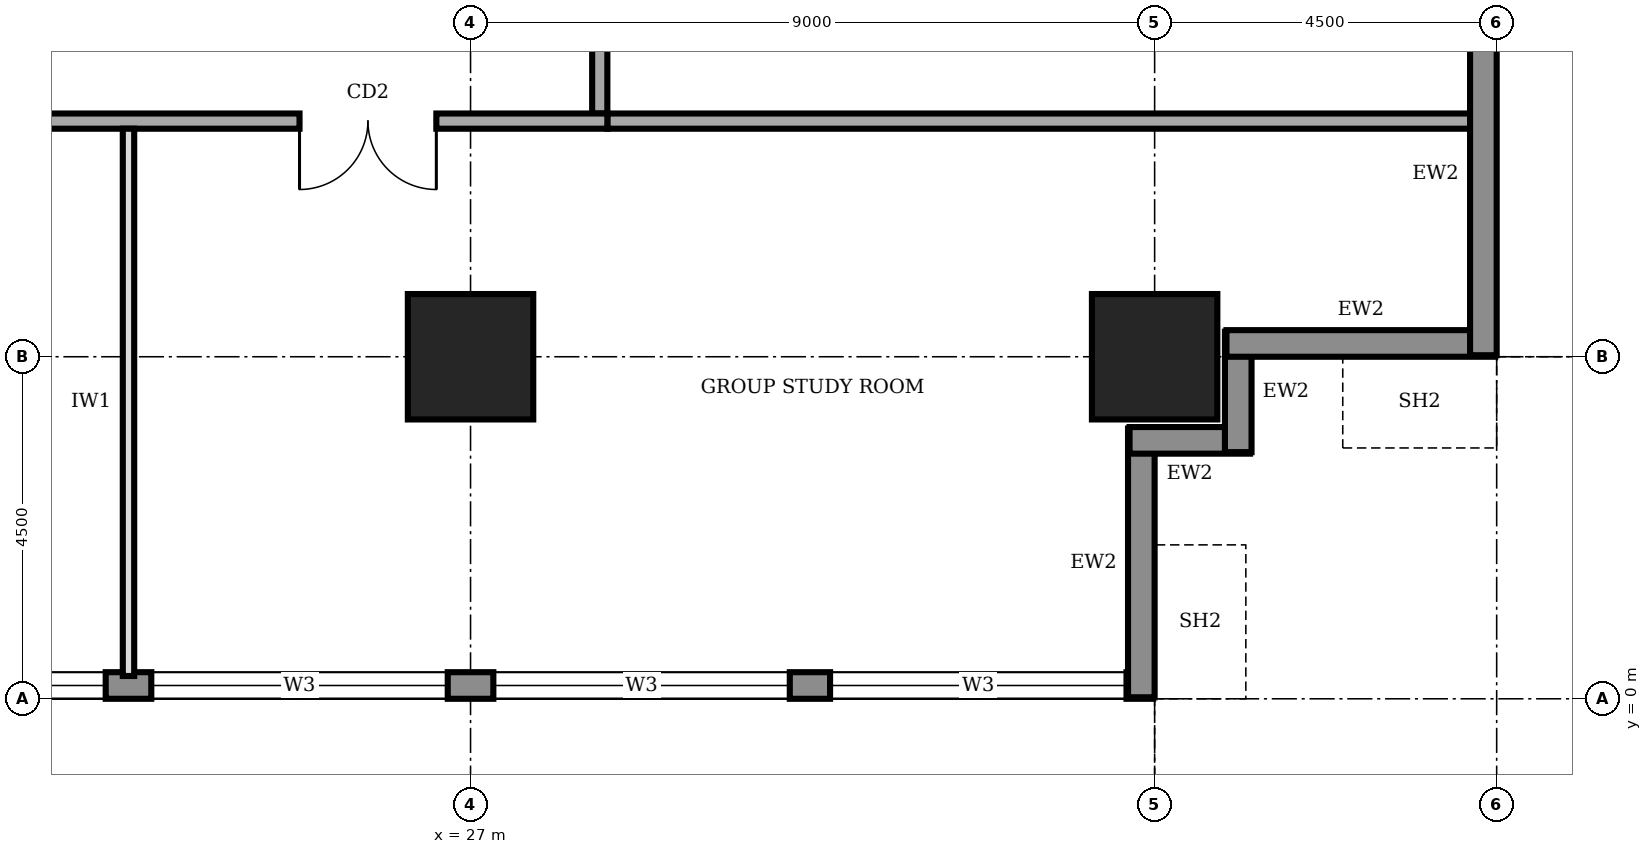
"""IFC4 building model, lengths in metres.
Left out: names, types, materials, properties, quantities, classifications, styles, units other than length and angle.
Written with IfcOpenShell. Run it as: python <this file> out.ifc"""

import sys

from ifc_helpers import new_model, si_unit, direction, frame, frame_2d, origin, origin_2d, place, context, subcontext, project, spatial, rectangle, extrude, element, fill, save


model = new_model("IFC4")
c1 = context("Model", 3, precision=1e-05, world=origin(), true_north=direction((0.0, 1.0)))
c2 = subcontext(c1, "Body", "Model", "MODEL_VIEW")
j1 = project(units=[si_unit("LENGTHUNIT", "METRE"), si_unit("PLANEANGLEUNIT", "RADIAN")], contexts=[c1])
p1 = place(None, origin())
s1 = spatial("IfcSite", under=j1, at=p1, CompositionType="ELEMENT")
p2 = place(p1, origin())
s2 = spatial("IfcBuilding", under=s1, at=p2, CompositionType="ELEMENT")
p3 = place(p2, frame((0.0, 0.0, 193.0)))
s3 = spatial("IfcBuildingStorey", under=s2, at=p3, CompositionType="ELEMENT", Elevation=193.0)
for number, where, z_axis, x_axis in (
    (1, (27.0, 4.5, 0.0), (0.0, 0.0, 1.0), (1.0, 0.0, 0.0)),
    (2, (36.0, 4.5, 0.0), (0.0, 0.0, 1.0), (1.0, 0.0, 0.0)),
):
    element("IfcColumn", number, at=place(p3, frame(where, z_axis=z_axis, x_axis=x_axis)), inside=s3, PredefinedType="COLUMN", context=c2, shape_type="SweptSolid", body=[
        extrude(rectangle(XDim=1.65, YDim=1.65, at=origin_2d()), origin(), (0.0, 0.0, 1.0), 4.0),
    ])
p4 = place(p3, frame((4.52, 0.175, 0.0), z_axis=(0.0, 0.0, 1.0), x_axis=(1.0, 0.0, 0.0)))
e3 = element("IfcWall", 3, at=p4, inside=s3, PredefinedType="STANDARD", context=c2, shape_type="SweptSolid", body=[
    extrude(rectangle(XDim=31.46, YDim=0.35, at=frame_2d((15.73, 0.0))), origin(), (0.0, 0.0, 1.0), 3.75),
])
p5 = place(p4, frame((4.78, 0.0, 0.95)))
e4 = element("IfcOpeningElement", 4, at=p5, cuts=e3, PredefinedType="OPENING", context=c2, shape_type="SweptSolid", body=[
    extrude(rectangle(XDim=3.9, YDim=1.8, at=frame_2d((1.95, 0.9))), frame((0.0, 0.185, 0.0), z_axis=(0.0, -1.0, 0.0), x_axis=(1.0, 0.0, 0.0)), (0.0, 0.0, 1.0), 0.37),
])
p6 = place(p4, frame((9.28, 0.0, 0.95)))
e5 = element("IfcOpeningElement", 5, at=p6, cuts=e3, PredefinedType="OPENING", context=c2, shape_type="SweptSolid", body=[
    extrude(rectangle(XDim=3.9, YDim=1.8, at=frame_2d((1.95, 0.9))), frame((0.0, 0.185, 0.0), z_axis=(0.0, -1.0, 0.0), x_axis=(1.0, 0.0, 0.0)), (0.0, 0.0, 1.0), 0.37),
])
p7 = place(p4, frame((13.78, 0.0, 0.95)))
e6 = element("IfcOpeningElement", 6, at=p7, cuts=e3, PredefinedType="OPENING", context=c2, shape_type="SweptSolid", body=[
    extrude(rectangle(XDim=3.9, YDim=1.8, at=frame_2d((1.95, 0.9))), frame((0.0, 0.185, 0.0), z_axis=(0.0, -1.0, 0.0), x_axis=(1.0, 0.0, 0.0)), (0.0, 0.0, 1.0), 0.37),
])
p8 = place(p4, frame((18.28, 0.0, 0.95)))
e7 = element("IfcOpeningElement", 7, at=p8, cuts=e3, PredefinedType="OPENING", context=c2, shape_type="SweptSolid", body=[
    extrude(rectangle(XDim=3.9, YDim=1.8, at=frame_2d((1.95, 0.9))), frame((0.0, 0.185, 0.0), z_axis=(0.0, -1.0, 0.0), x_axis=(1.0, 0.0, 0.0)), (0.0, 0.0, 1.0), 0.37),
])
p9 = place(p4, frame((22.78, 0.0, 0.95)))
e8 = element("IfcOpeningElement", 8, at=p9, cuts=e3, PredefinedType="OPENING", context=c2, shape_type="SweptSolid", body=[
    extrude(rectangle(XDim=3.9, YDim=1.8, at=frame_2d((1.95, 0.9))), frame((0.0, 0.185, 0.0), z_axis=(0.0, -1.0, 0.0), x_axis=(1.0, 0.0, 0.0)), (0.0, 0.0, 1.0), 0.37),
])
p10 = place(p4, frame((27.21, 0.0, 0.95)))
e9 = element("IfcOpeningElement", 9, at=p10, cuts=e3, PredefinedType="OPENING", context=c2, shape_type="SweptSolid", body=[
    extrude(rectangle(XDim=3.9, YDim=1.8, at=frame_2d((1.95, 0.9))), frame((0.0, 0.185, 0.0), z_axis=(0.0, -1.0, 0.0), x_axis=(1.0, 0.0, 0.0)), (0.0, 0.0, 1.0), 0.37),
])
p11 = place(p3, frame((35.825, 0.02, 0.0), z_axis=(0.0, 0.0, 1.0), x_axis=(0.0, 1.0, 0.0)))
e10 = element("IfcWall", 10, at=p11, inside=s3, PredefinedType="STANDARD", context=c2, shape_type="SweptSolid", body=[
    extrude(rectangle(XDim=3.535, YDim=0.35, at=frame_2d((1.768, 0.0))), origin(), (0.0, 0.0, 1.0), 2.85),
])
for number, where, z_axis, x_axis in (
    (11, (35.67, 3.4, 0.0), (0.0, 0.0, 1.0), (1.0, 0.0, 0.0)),
    (12, (37.1, 3.245, 0.0), (0.0, 0.0, 1.0), (0.0, 1.0, 0.0)),
):
    element("IfcWall", number, at=place(p3, frame(where, z_axis=z_axis, x_axis=x_axis)), inside=s3, PredefinedType="STANDARD", context=c2, shape_type="SweptSolid", body=[
        extrude(rectangle(XDim=1.585, YDim=0.35, at=frame_2d((0.792, 0.0))), origin(), (0.0, 0.0, 1.0), 3.75),
    ])
p12 = place(p3, frame((36.945, 4.675, 0.0), z_axis=(0.0, 0.0, 1.0), x_axis=(1.0, 0.0, 0.0)))
e13 = element("IfcWall", 13, at=p12, inside=s3, PredefinedType="STANDARD", context=c2, shape_type="SweptSolid", body=[
    extrude(rectangle(XDim=3.535, YDim=0.35, at=frame_2d((1.768, 0.0))), origin(), (0.0, 0.0, 1.0), 2.85),
])
p13 = place(p3, frame((40.325, 4.52, 0.0), z_axis=(0.0, 0.0, 1.0), x_axis=(0.0, 1.0, 0.0)))
e14 = element("IfcWall", 14, at=p13, inside=s3, PredefinedType="STANDARD", context=c2, shape_type="SweptSolid", body=[
    extrude(rectangle(XDim=31.46, YDim=0.35, at=frame_2d((15.73, 0.0))), origin(), (0.0, 0.0, 1.0), 3.75),
])
p14 = place(p13, frame((4.78, 0.0, 0.95)))
e15 = element("IfcOpeningElement", 15, at=p14, cuts=e14, PredefinedType="OPENING", context=c2, shape_type="SweptSolid", body=[
    extrude(rectangle(XDim=3.9, YDim=1.8, at=frame_2d((1.95, 0.9))), frame((0.0, 0.185, 0.0), z_axis=(0.0, -1.0, 0.0), x_axis=(1.0, 0.0, 0.0)), (0.0, 0.0, 1.0), 0.37),
])
p15 = place(p13, frame((9.28, 0.0, 0.95)))
e16 = element("IfcOpeningElement", 16, at=p15, cuts=e14, PredefinedType="OPENING", context=c2, shape_type="SweptSolid", body=[
    extrude(rectangle(XDim=3.9, YDim=1.8, at=frame_2d((1.95, 0.9))), frame((0.0, 0.185, 0.0), z_axis=(0.0, -1.0, 0.0), x_axis=(1.0, 0.0, 0.0)), (0.0, 0.0, 1.0), 0.37),
])
p16 = place(p13, frame((13.78, 0.0, 0.95)))
e17 = element("IfcOpeningElement", 17, at=p16, cuts=e14, PredefinedType="OPENING", context=c2, shape_type="SweptSolid", body=[
    extrude(rectangle(XDim=3.9, YDim=1.8, at=frame_2d((1.95, 0.9))), frame((0.0, 0.185, 0.0), z_axis=(0.0, -1.0, 0.0), x_axis=(1.0, 0.0, 0.0)), (0.0, 0.0, 1.0), 0.37),
])
p17 = place(p13, frame((18.28, 0.0, 0.95)))
e18 = element("IfcOpeningElement", 18, at=p17, cuts=e14, PredefinedType="OPENING", context=c2, shape_type="SweptSolid", body=[
    extrude(rectangle(XDim=3.9, YDim=1.8, at=frame_2d((1.95, 0.9))), frame((0.0, 0.185, 0.0), z_axis=(0.0, -1.0, 0.0), x_axis=(1.0, 0.0, 0.0)), (0.0, 0.0, 1.0), 0.37),
])
p18 = place(p13, frame((22.78, 0.0, 0.95)))
e19 = element("IfcOpeningElement", 19, at=p18, cuts=e14, PredefinedType="OPENING", context=c2, shape_type="SweptSolid", body=[
    extrude(rectangle(XDim=3.9, YDim=1.8, at=frame_2d((1.95, 0.9))), frame((0.0, 0.185, 0.0), z_axis=(0.0, -1.0, 0.0), x_axis=(1.0, 0.0, 0.0)), (0.0, 0.0, 1.0), 0.37),
])
p19 = place(p13, frame((27.21, 0.0, 0.95)))
e20 = element("IfcOpeningElement", 20, at=p19, cuts=e14, PredefinedType="OPENING", context=c2, shape_type="SweptSolid", body=[
    extrude(rectangle(XDim=3.9, YDim=1.8, at=frame_2d((1.95, 0.9))), frame((0.0, 0.185, 0.0), z_axis=(0.0, -1.0, 0.0), x_axis=(1.0, 0.0, 0.0)), (0.0, 0.0, 1.0), 0.37),
])
p20 = place(p3, frame((11.9, 7.6, 0.0), z_axis=(0.0, 0.0, 1.0), x_axis=(1.0, 0.0, 0.0)))
e21 = element("IfcWall", 21, at=p20, inside=s3, PredefinedType="SOLIDWALL", context=c2, shape_type="SweptSolid", body=[
    extrude(rectangle(XDim=16.9, YDim=0.2, at=frame_2d((8.45, 0.0))), origin(), (0.0, 0.0, 1.0), 3.75),
])
p21 = place(p20, frame((2.05, 0.0, 0.0)))
e22 = element("IfcOpeningElement", 22, at=p21, cuts=e21, PredefinedType="OPENING", context=c2, shape_type="SweptSolid", body=[
    extrude(rectangle(XDim=1.8, YDim=2.1, at=frame_2d((0.9, 1.05))), frame((0.0, 0.11, 0.0), z_axis=(0.0, -1.0, 0.0), x_axis=(1.0, 0.0, 0.0)), (0.0, 0.0, 1.0), 0.22),
])
p22 = place(p20, frame((7.85, 0.0, 0.0)))
e23 = element("IfcOpeningElement", 23, at=p22, cuts=e21, PredefinedType="OPENING", context=c2, shape_type="SweptSolid", body=[
    extrude(rectangle(XDim=1.0, YDim=2.1, at=frame_2d((0.5, 1.05))), frame((0.0, 0.11, 0.0), z_axis=(0.0, -1.0, 0.0), x_axis=(1.0, 0.0, 0.0)), (0.0, 0.0, 1.0), 0.22),
])
p23 = place(p20, frame((12.85, 0.0, 0.0)))
e24 = element("IfcOpeningElement", 24, at=p23, cuts=e21, PredefinedType="OPENING", context=c2, shape_type="SweptSolid", body=[
    extrude(rectangle(XDim=1.8, YDim=2.1, at=frame_2d((0.9, 1.05))), frame((0.0, 0.11, 0.0), z_axis=(0.0, -1.0, 0.0), x_axis=(1.0, 0.0, 0.0)), (0.0, 0.0, 1.0), 0.22),
])
p24 = place(p3, frame((28.7, 7.7, 0.0), z_axis=(0.0, 0.0, 1.0), x_axis=(0.0, 1.0, 0.0)))
e25 = element("IfcWall", 25, at=p24, inside=s3, PredefinedType="SOLIDWALL", context=c2, shape_type="SweptSolid", body=[
    extrude(rectangle(XDim=25.3, YDim=0.2, at=frame_2d((12.65, 0.0))), origin(), (0.0, 0.0, 1.0), 3.75),
])
p25 = place(p24, frame((4.15, 0.0, 0.0)))
e26 = element("IfcOpeningElement", 26, at=p25, cuts=e25, PredefinedType="OPENING", context=c2, shape_type="SweptSolid", body=[
    extrude(rectangle(XDim=1.8, YDim=2.1, at=frame_2d((0.9, 1.05))), frame((0.0, 0.11, 0.0), z_axis=(0.0, -1.0, 0.0), x_axis=(1.0, 0.0, 0.0)), (0.0, 0.0, 1.0), 0.22),
])
p26 = place(p24, frame((17.1, 0.0, 0.0)))
e27 = element("IfcOpeningElement", 27, at=p26, cuts=e25, PredefinedType="OPENING", context=c2, shape_type="SweptSolid", body=[
    extrude(rectangle(XDim=1.4, YDim=2.1, at=frame_2d((0.7, 1.05))), frame((0.0, 0.11, 0.0), z_axis=(0.0, -1.0, 0.0), x_axis=(1.0, 0.0, 0.0)), (0.0, 0.0, 1.0), 0.22),
])
p27 = place(p3, frame((28.8, 7.6, 0.0), z_axis=(0.0, 0.0, 1.0), x_axis=(1.0, 0.0, 0.0)))
e28 = element("IfcWall", 28, at=p27, inside=s3, PredefinedType="SOLIDWALL", context=c2, shape_type="SweptSolid", body=[
    extrude(rectangle(XDim=11.4, YDim=0.2, at=frame_2d((5.7, 0.0))), origin(), (0.0, 0.0, 1.0), 3.75),
])
p28 = place(p3, frame((22.5, 0.3, 0.0), z_axis=(0.0, 0.0, 1.0), x_axis=(0.0, 1.0, 0.0)))
e29 = element("IfcWall", 29, at=p28, inside=s3, PredefinedType="PARTITIONING", context=c2, shape_type="SweptSolid", body=[
    extrude(rectangle(XDim=7.2, YDim=0.15, at=frame_2d((3.6, 0.0))), origin(), (0.0, 0.0, 1.0), 3.75),
])
p29 = place(p7, origin())
e30 = element("IfcWindow", 30, at=p29, inside=s3, PartitioningType="SINGLE_PANEL", PredefinedType="WINDOW", context=c2, shape_type="SweptSolid", body=[
    extrude(rectangle(XDim=3.9, YDim=1.8, at=frame_2d((1.95, 0.9))), frame((0.0, 0.03, 0.0), z_axis=(0.0, -1.0, 0.0), x_axis=(1.0, 0.0, 0.0)), (0.0, 0.0, 1.0), 0.06),
])
fill(e6, e30)
p30 = place(p8, origin())
e31 = element("IfcWindow", 31, at=p30, inside=s3, PartitioningType="SINGLE_PANEL", PredefinedType="WINDOW", context=c2, shape_type="SweptSolid", body=[
    extrude(rectangle(XDim=3.9, YDim=1.8, at=frame_2d((1.95, 0.9))), frame((0.0, 0.03, 0.0), z_axis=(0.0, -1.0, 0.0), x_axis=(1.0, 0.0, 0.0)), (0.0, 0.0, 1.0), 0.06),
])
fill(e7, e31)
p31 = place(p9, origin())
e32 = element("IfcWindow", 32, at=p31, inside=s3, PartitioningType="SINGLE_PANEL", PredefinedType="WINDOW", context=c2, shape_type="SweptSolid", body=[
    extrude(rectangle(XDim=3.9, YDim=1.8, at=frame_2d((1.95, 0.9))), frame((0.0, 0.03, 0.0), z_axis=(0.0, -1.0, 0.0), x_axis=(1.0, 0.0, 0.0)), (0.0, 0.0, 1.0), 0.06),
])
fill(e8, e32)
p32 = place(p10, origin())
e33 = element("IfcWindow", 33, at=p32, inside=s3, PartitioningType="SINGLE_PANEL", PredefinedType="WINDOW", context=c2, shape_type="SweptSolid", body=[
    extrude(rectangle(XDim=3.9, YDim=1.8, at=frame_2d((1.95, 0.9))), frame((0.0, 0.03, 0.0), z_axis=(0.0, -1.0, 0.0), x_axis=(1.0, 0.0, 0.0)), (0.0, 0.0, 1.0), 0.06),
])
fill(e9, e33)
p33 = place(p23, frame((1.8, 0.0, 0.0), z_axis=(0.0, 0.0, 1.0), x_axis=(-1.0, 0.0, 0.0)))
e34 = element("IfcDoor", 34, at=p33, inside=s3, OperationType="DOUBLE_DOOR_SINGLE_SWING", PredefinedType="DOOR", context=c2, shape_type="SweptSolid", body=[
    extrude(rectangle(XDim=1.8, YDim=2.1, at=frame_2d((0.9, 1.05))), frame((0.0, 0.025, 0.0), z_axis=(0.0, -1.0, 0.0), x_axis=(1.0, 0.0, 0.0)), (0.0, 0.0, 1.0), 0.05),
])
fill(e24, e34)
save(model, sys.argv[1])
